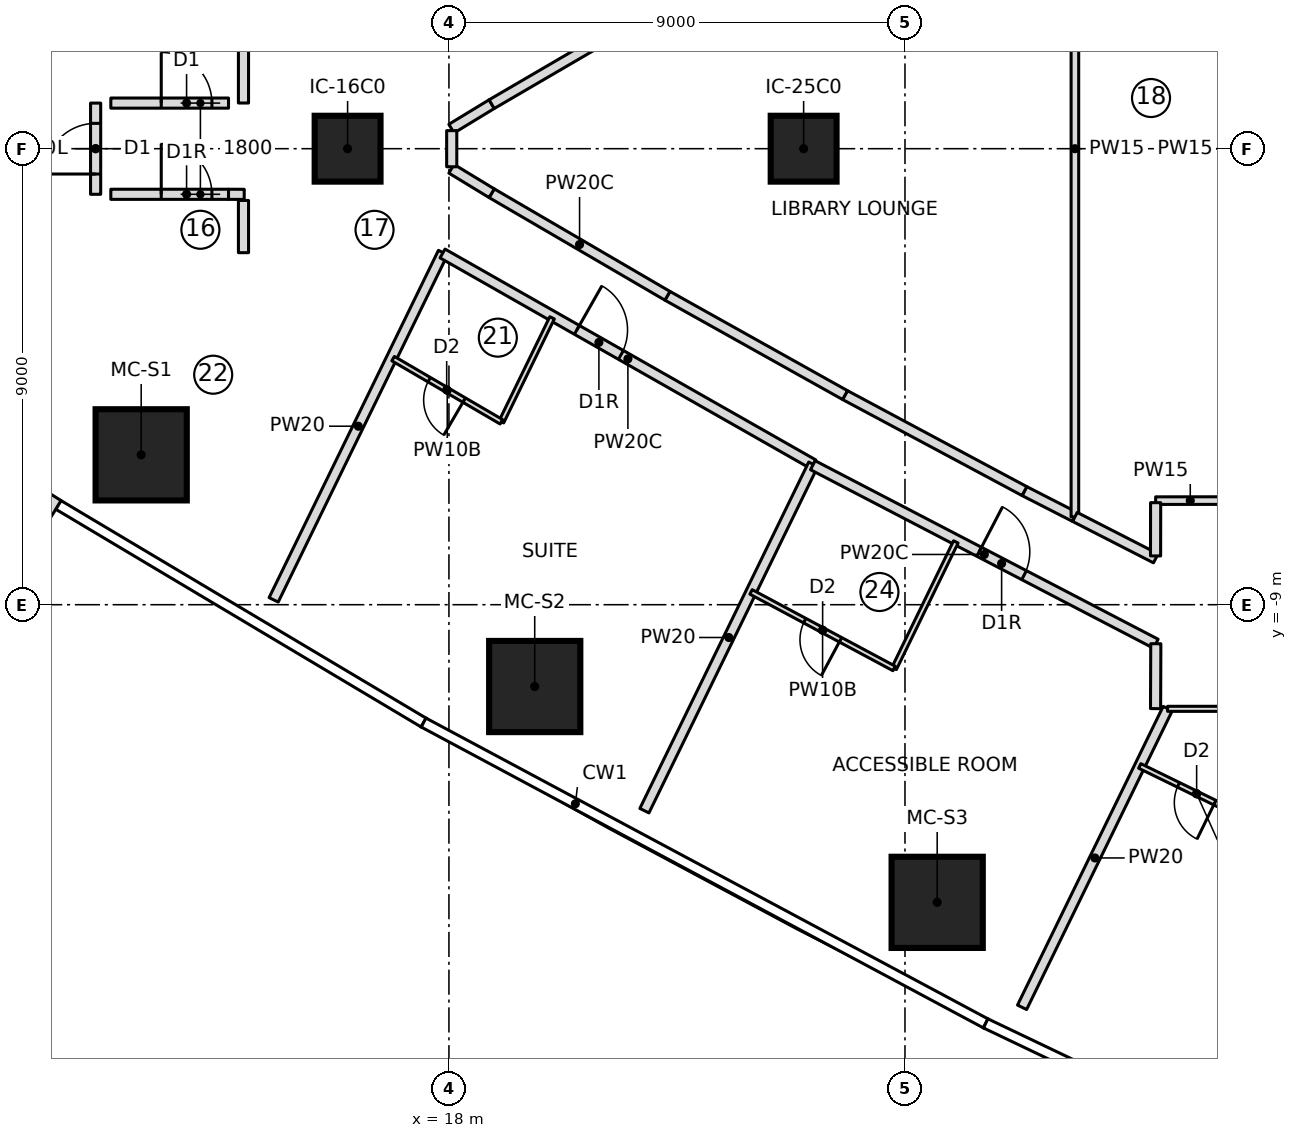
"""IFC4 building model, lengths in metres.
Left out: names, types, materials, properties, quantities, classifications, styles, units other than length and angle.
Written with IfcOpenShell. Run it as: python <this file> out.ifc"""

import sys

from ifc_helpers import new_model, si_unit, direction, frame, frame_2d, origin, origin_2d, place, context, subcontext, project, spatial, polyline, rectangle, outline, extrude, element, fill, save


model = new_model("IFC4")
c1 = context("Model", 3, precision=1e-05, world=origin(), true_north=direction((0.0, 1.0)))
c2 = subcontext(c1, "Body", "Model", "MODEL_VIEW")
j1 = project(units=[si_unit("LENGTHUNIT", "METRE"), si_unit("PLANEANGLEUNIT", "RADIAN")], contexts=[c1])
p1 = place(None, origin())
s1 = spatial("IfcSite", under=j1, at=p1, CompositionType="ELEMENT")
p2 = place(p1, origin())
s2 = spatial("IfcBuilding", under=s1, at=p2, CompositionType="ELEMENT")
p3 = place(p2, frame((0.0, 0.0, 53.8)))
s3 = spatial("IfcBuildingStorey", under=s2, at=p3, CompositionType="ELEMENT", Elevation=53.8)
for number, where, z_axis, x_axis in (
    (1, (11.927, -6.042, 0.0), (0.0, 0.0, 1.0), (1.0, 0.0, 0.0)),
    (2, (19.693, -10.615, 0.0), (0.0, 0.0, 1.0), (1.0, 0.0, 0.0)),
    (3, (27.635, -14.874, 0.0), (0.0, 0.0, 1.0), (1.0, 0.0, 0.0)),
):
    element("IfcColumn", number, at=place(p3, frame(where, z_axis=z_axis, x_axis=x_axis)), inside=s3, PredefinedType="COLUMN", context=c2, shape_type="SweptSolid", body=[
        extrude(rectangle(XDim=1.8, YDim=1.8, at=origin_2d()), origin(), (0.0, 0.0, 1.0), 3.55),
    ])
for number, where, z_axis, x_axis in (
    (4, (16.0, 0.0, 0.0), (0.0, 0.0, 1.0), (1.0, 0.0, 0.0)),
    (5, (25.0, 0.0, 0.0), (0.0, 0.0, 1.0), (1.0, 0.0, 0.0)),
):
    element("IfcColumn", number, at=place(p3, frame(where, z_axis=z_axis, x_axis=x_axis)), inside=s3, PredefinedType="COLUMN", context=c2, shape_type="SweptSolid", body=[
        extrude(rectangle(XDim=1.3, YDim=1.3, at=origin_2d()), origin(), (0.0, 0.0, 1.0), 3.55),
    ])
p4 = place(p3, frame((6.698, -4.87, 0.0), z_axis=(0.0, 0.0, 1.0), x_axis=(0.844551578623, -0.535474211372, 0.0)))
e6 = element("IfcWall", 6, at=p4, inside=s3, PredefinedType="NOTDEFINED", context=c2, shape_type="SweptSolid", body=[
    extrude(outline(polyline([(-0.034, -0.2), (4.196, -0.2), (4.196, 0.2), (0.034, 0.2), (-0.034, -0.2)])), origin(), (0.0, 0.0, 1.0), 3.25),
])
p5 = place(p4, frame((0.998, 0.0, 0.6)))
e7 = element("IfcOpeningElement", 7, at=p5, cuts=e6, PredefinedType="OPENING", context=c2, shape_type="SweptSolid", body=[
    extrude(outline(polyline([(0.0, 1.35), (0.084, 1.771), (0.322, 2.128), (0.679, 2.366), (1.1, 2.45), (1.521, 2.366), (1.878, 2.128), (2.116, 1.771), (2.2, 1.35), (2.2, 1.1), (2.116, 0.679), (1.878, 0.322), (1.521, 0.084), (1.1, 0.0), (0.679, 0.084), (0.322, 0.322), (0.084, 0.679), (0.0, 1.1), (0.0, 1.35)])), frame((0.0, 0.21, 0.0), z_axis=(0.0, -1.0, 0.0), x_axis=(1.0, 0.0, 0.0)), (0.0, 0.0, 1.0), 0.42),
])
p6 = place(p3, frame((11.027, -0.9, 0.0), z_axis=(0.0, 0.0, 1.0), x_axis=(0.0, 1.0, 0.0)))
e8 = element("IfcWall", 8, at=p6, inside=s3, PredefinedType="PARTITIONING", context=c2, shape_type="SweptSolid", body=[
    extrude(rectangle(XDim=1.8, YDim=0.2, at=frame_2d((0.9, 0.0))), origin(), (0.0, 0.0, 1.0), 3.25),
])
p7 = place(p6, frame((0.4, 0.0, 0.0)))
e9 = element("IfcOpeningElement", 9, at=p7, cuts=e8, PredefinedType="OPENING", context=c2, shape_type="SweptSolid", body=[
    extrude(rectangle(XDim=1.0, YDim=2.1, at=frame_2d((0.5, 1.05))), frame((0.0, 0.11, 0.0), z_axis=(0.0, -1.0, 0.0), x_axis=(1.0, 0.0, 0.0)), (0.0, 0.0, 1.0), 0.22),
])
p8 = place(p3, frame((14.541, -8.904, 0.0), z_axis=(0.0, 0.0, 1.0), x_axis=(0.438213564788, 0.898870887078, 0.0)))
e10 = element("IfcWall", 10, at=p8, inside=s3, PredefinedType="PARTITIONING", context=c2, shape_type="SweptSolid", body=[
    extrude(rectangle(XDim=7.625, YDim=0.2, at=frame_2d((3.813, 0.0))), origin(), (0.0, 0.0, 1.0), 3.25),
])
p9 = place(p3, frame((17.874, -2.068, 0.0), z_axis=(0.0, 0.0, 1.0), x_axis=(0.869280098963, -0.494319845391, 0.0)))
e11 = element("IfcWall", 11, at=p9, inside=s3, PredefinedType="PARTITIONING", context=c2, shape_type="SweptSolid", body=[
    extrude(rectangle(XDim=8.417, YDim=0.2, at=frame_2d((4.208, 0.0))), origin(), (0.0, 0.0, 1.0), 3.25),
])
p10 = place(p9, frame((3.05, 0.0, 0.0)))
e12 = element("IfcOpeningElement", 12, at=p10, cuts=e11, PredefinedType="OPENING", context=c2, shape_type="SweptSolid", body=[
    extrude(rectangle(XDim=1.0, YDim=2.1, at=frame_2d((0.5, 1.05))), frame((0.0, 0.11, 0.0), z_axis=(0.0, -1.0, 0.0), x_axis=(1.0, 0.0, 0.0)), (0.0, 0.0, 1.0), 0.22),
])
p11 = place(p3, frame((20.035, -3.338, 0.0), z_axis=(0.0, 0.0, 1.0), x_axis=(-0.438122322582, -0.898915363344, 0.0)))
e13 = element("IfcWall", 13, at=p11, inside=s3, PredefinedType="PARTITIONING", context=c2, shape_type="SweptSolid", body=[
    extrude(rectangle(XDim=2.283, YDim=0.1, at=frame_2d((1.142, 0.0))), origin(), (0.0, 0.0, 1.0), 3.25),
])
p12 = place(p3, frame((19.035, -5.39, 0.0), z_axis=(0.0, 0.0, 1.0), x_axis=(-0.863707305865, 0.503993739837, 0.0)))
e14 = element("IfcWall", 14, at=p12, inside=s3, PredefinedType="PARTITIONING", context=c2, shape_type="SweptSolid", body=[
    extrude(rectangle(XDim=2.474, YDim=0.1, at=frame_2d((1.237, 0.0))), origin(), (0.0, 0.0, 1.0), 3.25),
])
p13 = place(p12, frame((0.85, 0.0, 0.0)))
e15 = element("IfcOpeningElement", 15, at=p13, cuts=e14, PredefinedType="OPENING", context=c2, shape_type="SweptSolid", body=[
    extrude(rectangle(XDim=0.8, YDim=2.1, at=frame_2d((0.4, 1.05))), frame((0.0, 0.06, 0.0), z_axis=(0.0, -1.0, 0.0), x_axis=(1.0, 0.0, 0.0)), (0.0, 0.0, 1.0), 0.12),
])
p14 = place(p3, frame((21.857, -13.065, 0.0), z_axis=(0.0, 0.0, 1.0), x_axis=(0.438202895602, 0.898876088394, 0.0)))
e16 = element("IfcWall", 16, at=p14, inside=s3, PredefinedType="PARTITIONING", context=c2, shape_type="SweptSolid", body=[
    extrude(rectangle(XDim=7.605, YDim=0.2, at=frame_2d((3.803, 0.0))), origin(), (0.0, 0.0, 1.0), 3.25),
])
p15 = place(p3, frame((25.181, -6.247, 0.0), z_axis=(0.0, 0.0, 1.0), x_axis=(0.887026569793, -0.461718382221, 0.0)))
e17 = element("IfcWall", 17, at=p15, inside=s3, PredefinedType="PARTITIONING", context=c2, shape_type="SweptSolid", body=[
    extrude(rectangle(XDim=7.631, YDim=0.2, at=frame_2d((3.815, 0.0))), origin(), (0.0, 0.0, 1.0), 3.25),
])
p16 = place(p15, frame((3.7, 0.0, 0.0)))
e18 = element("IfcOpeningElement", 18, at=p16, cuts=e17, PredefinedType="OPENING", context=c2, shape_type="SweptSolid", body=[
    extrude(rectangle(XDim=1.0, YDim=2.1, at=frame_2d((0.5, 1.05))), frame((0.0, 0.11, 0.0), z_axis=(0.0, -1.0, 0.0), x_axis=(1.0, 0.0, 0.0)), (0.0, 0.0, 1.0), 0.22),
])
p17 = place(p3, frame((28.003, -7.761, 0.0), z_axis=(0.0, 0.0, 1.0), x_axis=(-0.43822975423, -0.898862994292, 0.0)))
e19 = element("IfcWall", 19, at=p17, inside=s3, PredefinedType="PARTITIONING", context=c2, shape_type="SweptSolid", body=[
    extrude(rectangle(XDim=2.779, YDim=0.1, at=frame_2d((1.389, 0.0))), origin(), (0.0, 0.0, 1.0), 3.25),
])
p18 = place(p3, frame((26.785, -10.259, 0.0), z_axis=(0.0, 0.0, 1.0), x_axis=(-0.881653338438, 0.471897648672, 0.0)))
e20 = element("IfcWall", 20, at=p18, inside=s3, PredefinedType="PARTITIONING", context=c2, shape_type="SweptSolid", body=[
    extrude(rectangle(XDim=3.202, YDim=0.1, at=frame_2d((1.601, 0.0))), origin(), (0.0, 0.0, 1.0), 3.25),
])
p19 = place(p18, frame((1.2, 0.0, 0.0)))
e21 = element("IfcOpeningElement", 21, at=p19, cuts=e20, PredefinedType="OPENING", context=c2, shape_type="SweptSolid", body=[
    extrude(rectangle(XDim=0.8, YDim=2.1, at=frame_2d((0.4, 1.05))), frame((0.0, 0.06, 0.0), z_axis=(0.0, -1.0, 0.0), x_axis=(1.0, 0.0, 0.0)), (0.0, 0.0, 1.0), 0.12),
])
p20 = place(p3, frame((29.31, -16.946, 0.0), z_axis=(0.0, 0.0, 1.0), x_axis=(0.438228560869, 0.898863576099, 0.0)))
e22 = element("IfcWall", 22, at=p20, inside=s3, PredefinedType="PARTITIONING", context=c2, shape_type="SweptSolid", body=[
    extrude(rectangle(XDim=6.559, YDim=0.2, at=frame_2d((3.28, 0.0))), origin(), (0.0, 0.0, 1.0), 3.25),
])
p21 = place(p3, frame((33.879, -13.28, 0.0), z_axis=(0.0, 0.0, 1.0), x_axis=(-0.89845285455, 0.439070003702, 0.0)))
e23 = element("IfcWall", 23, at=p21, inside=s3, PredefinedType="PARTITIONING", context=c2, shape_type="SweptSolid", body=[
    extrude(rectangle(XDim=2.5, YDim=0.1, at=frame_2d((1.25, 0.0))), origin(), (0.0, 0.0, 1.0), 3.25),
])
p22 = place(p21, frame((0.85, 0.0, 0.0)))
e24 = element("IfcOpeningElement", 24, at=p22, cuts=e23, PredefinedType="OPENING", context=c2, shape_type="SweptSolid", body=[
    extrude(rectangle(XDim=0.8, YDim=2.1, at=frame_2d((0.4, 1.05))), frame((0.0, 0.06, 0.0), z_axis=(0.0, -1.0, 0.0), x_axis=(1.0, 0.0, 0.0)), (0.0, 0.0, 1.0), 0.12),
])
p23 = place(p3, frame((30.353, -7.268, 0.0), z_axis=(0.0, 0.0, 1.0), x_axis=(-0.890241988655, 0.455487872106, 0.0)))
e25 = element("IfcWall", 25, at=p23, inside=s3, PredefinedType="PARTITIONING", context=c2, shape_type="SweptSolid", body=[
    extrude(rectangle(XDim=1.119, YDim=0.2, at=frame_2d((0.559, 0.0))), origin(), (0.0, 0.0, 1.0), 3.25),
])
p24 = place(p3, frame((29.357, -6.758, 0.0), z_axis=(0.0, 0.0, 1.0), x_axis=(-0.881655245922, 0.471894084874, 0.0)))
e26 = element("IfcWall", 26, at=p24, inside=s3, PredefinedType="PARTITIONING", context=c2, shape_type="SweptSolid", body=[
    extrude(rectangle(XDim=4.016, YDim=0.2, at=frame_2d((2.008, 0.0))), origin(), (0.0, 0.0, 1.0), 3.25),
])
p25 = place(p3, frame((25.817, -4.863, 0.0), z_axis=(0.0, 0.0, 1.0), x_axis=(-0.872800289292, 0.488077509225, 0.0)))
e27 = element("IfcWall", 27, at=p25, inside=s3, PredefinedType="PARTITIONING", context=c2, shape_type="SweptSolid", body=[
    extrude(rectangle(XDim=4.016, YDim=0.2, at=frame_2d((2.008, 0.0))), origin(), (0.0, 0.0, 1.0), 3.25),
])
p26 = place(p3, frame((22.312, -2.903, 0.0), z_axis=(0.0, 0.0, 1.0), x_axis=(-0.863710538269, 0.503988200341, 0.0)))
e28 = element("IfcWall", 28, at=p26, inside=s3, PredefinedType="PARTITIONING", context=c2, shape_type="SweptSolid", body=[
    extrude(rectangle(XDim=4.016, YDim=0.2, at=frame_2d((2.008, 0.0))), origin(), (0.0, 0.0, 1.0), 3.25),
])
for number, where, z_axis, x_axis in (
    (29, (18.844, -0.879, 0.0), (0.0, 0.0, 1.0), (-0.854, 0.52, 0.0)),
    (30, (18.05, 0.396, 0.0), (0.0, 0.0, 1.0), (0.854, 0.52, 0.0)),
):
    element("IfcWall", number, at=place(p3, frame(where, z_axis=z_axis, x_axis=x_axis)), inside=s3, PredefinedType="PARTITIONING", context=c2, shape_type="SweptSolid", body=[
        extrude(rectangle(XDim=0.929, YDim=0.2, at=frame_2d((0.464, 0.0))), origin(), (0.0, 0.0, 1.0), 3.25),
    ])
p27 = place(p3, frame((18.844, 0.879, 0.0), z_axis=(0.0, 0.0, 1.0), x_axis=(0.863710538269, 0.503988200341, 0.0)))
e31 = element("IfcWall", 31, at=p27, inside=s3, PredefinedType="PARTITIONING", context=c2, shape_type="SweptSolid", body=[
    extrude(rectangle(XDim=4.016, YDim=0.2, at=frame_2d((2.008, 0.0))), origin(), (0.0, 0.0, 1.0), 3.25),
])
p28 = place(p3, frame((30.353, -7.268, 0.0), z_axis=(0.0, 0.0, 1.0), x_axis=(0.0, 1.0, 0.0)))
e32 = element("IfcWall", 32, at=p28, inside=s3, PredefinedType="PARTITIONING", context=c2, shape_type="SweptSolid", body=[
    extrude(rectangle(XDim=14.535, YDim=0.15, at=frame_2d((7.268, 0.0))), origin(), (0.0, 0.0, 1.0), 3.25),
])
p29 = place(p3, frame((31.95, -8.085, 0.0), z_axis=(0.0, 0.0, 1.0), x_axis=(-0.890195531144, 0.455578660969, 0.0)))
e33 = element("IfcWall", 33, at=p29, inside=s3, PredefinedType="PARTITIONING", context=c2, shape_type="SweptSolid", body=[
    extrude(rectangle(XDim=1.794, YDim=0.2, at=frame_2d((0.897, 0.0))), origin(), (0.0, 0.0, 1.0), 3.25),
])
p30 = place(p3, frame((32.182, -11.055, 0.0), z_axis=(0.0, 0.0, 1.0), x_axis=(1.0, 0.0, 0.0)))
e34 = element("IfcWall", 34, at=p30, inside=s3, PredefinedType="PARTITIONING", context=c2, shape_type="SweptSolid", body=[
    extrude(rectangle(XDim=2.371, YDim=0.1, at=frame_2d((1.186, 0.0))), origin(), (0.0, 0.0, 1.0), 3.25),
])
p31 = place(p3, frame((11.327, 0.9, 0.0), z_axis=(0.0, 0.0, 1.0), x_axis=(1.0, 0.0, 0.0)))
e35 = element("IfcWall", 35, at=p31, inside=s3, PredefinedType="PARTITIONING", context=c2, shape_type="SweptSolid", body=[
    extrude(rectangle(XDim=2.323, YDim=0.2, at=frame_2d((1.161, 0.0))), origin(), (0.0, 0.0, 1.0), 3.25),
])
p32 = place(p31, frame((0.995, 0.0, 0.0)))
e36 = element("IfcOpeningElement", 36, at=p32, cuts=e35, PredefinedType="OPENING", context=c2, shape_type="SweptSolid", body=[
    extrude(rectangle(XDim=1.0, YDim=2.1, at=frame_2d((0.5, 1.05))), frame((0.0, 0.11, 0.0), z_axis=(0.0, -1.0, 0.0), x_axis=(1.0, 0.0, 0.0)), (0.0, 0.0, 1.0), 0.22),
])
p33 = place(p3, frame((11.327, -0.9, 0.0), z_axis=(0.0, 0.0, 1.0), x_axis=(1.0, 0.0, 0.0)))
e37 = element("IfcWall", 37, at=p33, inside=s3, PredefinedType="PARTITIONING", context=c2, shape_type="SweptSolid", body=[
    extrude(rectangle(XDim=2.323, YDim=0.2, at=frame_2d((1.161, 0.0))), origin(), (0.0, 0.0, 1.0), 3.25),
])
p34 = place(p33, frame((0.995, 0.0, 0.0)))
e38 = element("IfcOpeningElement", 38, at=p34, cuts=e37, PredefinedType="OPENING", context=c2, shape_type="SweptSolid", body=[
    extrude(rectangle(XDim=1.0, YDim=2.1, at=frame_2d((0.5, 1.05))), frame((0.0, 0.11, 0.0), z_axis=(0.0, -1.0, 0.0), x_axis=(1.0, 0.0, 0.0)), (0.0, 0.0, 1.0), 0.22),
])
p35 = place(p3, frame((18.055, -0.357, 0.0), z_axis=(0.0, 0.0, 1.0), x_axis=(0.0, 1.0, 0.0)))
e39 = element("IfcWall", 39, at=p35, inside=s3, PredefinedType="PARTITIONING", context=c2, shape_type="SweptSolid", body=[
    extrude(rectangle(XDim=0.713, YDim=0.2, at=frame_2d((0.357, 0.0))), origin(), (0.0, 0.0, 1.0), 3.25),
])
p36 = place(p3, frame((33.313, -6.945, 0.0), z_axis=(0.0, 0.0, 1.0), x_axis=(-0.999999744625, -0.00071466839, 0.0)))
e40 = element("IfcWall", 40, at=p36, inside=s3, PredefinedType="PARTITIONING", context=c2, shape_type="SweptSolid", body=[
    extrude(rectangle(XDim=1.366, YDim=0.15, at=frame_2d((0.683, 0.0))), origin(), (0.0, 0.0, 1.0), 3.25),
])
p37 = place(p3, frame((31.947, -6.986, 0.0), z_axis=(0.0, 0.0, 1.0), x_axis=(-0.001625636496, -0.999998678652, 0.0)))
e41 = element("IfcWall", 41, at=p37, inside=s3, PredefinedType="PARTITIONING", context=c2, shape_type="SweptSolid", body=[
    extrude(rectangle(XDim=1.051, YDim=0.2, at=frame_2d((0.526, 0.0))), origin(), (0.0, 0.0, 1.0), 3.25),
])
p38 = place(p3, frame((13.946, 2.052, 0.0), z_axis=(0.0, 0.0, 1.0), x_axis=(-0.000424178117, -0.999999910036, 0.0)))
e42 = element("IfcWall", 42, at=p38, inside=s3, PredefinedType="PARTITIONING", context=c2, shape_type="SweptSolid", body=[
    extrude(rectangle(XDim=1.151, YDim=0.2, at=frame_2d((0.576, 0.0))), origin(), (0.0, 0.0, 1.0), 3.25),
])
p39 = place(p3, frame((13.65, -0.9, 0.0), z_axis=(0.0, 0.0, 1.0), x_axis=(0.999984810316, -0.005511727301, 0.0)))
e43 = element("IfcWall", 43, at=p39, inside=s3, PredefinedType="PARTITIONING", context=c2, shape_type="SweptSolid", body=[
    extrude(rectangle(XDim=0.31, YDim=0.2, at=frame_2d((0.155, 0.0))), origin(), (0.0, 0.0, 1.0), 3.25),
])
p40 = place(p3, frame((13.945, -1.021, 0.0), z_axis=(0.0, 0.0, 1.0), x_axis=(0.000473596916, -0.999999887853, 0.0)))
e44 = element("IfcWall", 44, at=p40, inside=s3, PredefinedType="PARTITIONING", context=c2, shape_type="SweptSolid", body=[
    extrude(rectangle(XDim=1.031, YDim=0.2, at=frame_2d((0.516, 0.0))), origin(), (0.0, 0.0, 1.0), 3.25),
])
p41 = place(p3, frame((31.95, -9.77, 0.0), z_axis=(0.0, 0.0, 1.0), x_axis=(-0.003811674235, -0.999992735543, 0.0)))
e45 = element("IfcWall", 45, at=p41, inside=s3, PredefinedType="PARTITIONING", context=c2, shape_type="SweptSolid", body=[
    extrude(rectangle(XDim=1.281, YDim=0.2, at=frame_2d((0.641, 0.0))), origin(), (0.0, 0.0, 1.0), 3.25),
])
p42 = place(p32, origin())
e46 = element("IfcDoor", 46, at=p42, inside=s3, OperationType="SINGLE_SWING_LEFT", PredefinedType="DOOR", context=c2, shape_type="SweptSolid", body=[
    extrude(rectangle(XDim=1.0, YDim=2.1, at=frame_2d((0.5, 1.05))), frame((0.0, 0.025, 0.0), z_axis=(0.0, -1.0, 0.0), x_axis=(1.0, 0.0, 0.0)), (0.0, 0.0, 1.0), 0.05),
])
fill(e36, e46)
p43 = place(p34, origin())
e47 = element("IfcDoor", 47, at=p43, inside=s3, OperationType="SINGLE_SWING_RIGHT", PredefinedType="DOOR", context=c2, shape_type="SweptSolid", body=[
    extrude(rectangle(XDim=1.0, YDim=2.1, at=frame_2d((0.5, 1.05))), frame((0.0, 0.025, 0.0), z_axis=(0.0, -1.0, 0.0), x_axis=(1.0, 0.0, 0.0)), (0.0, 0.0, 1.0), 0.05),
])
fill(e38, e47)
p44 = place(p7, origin())
e48 = element("IfcDoor", 48, at=p44, inside=s3, OperationType="SINGLE_SWING_LEFT", PredefinedType="DOOR", context=c2, shape_type="SweptSolid", body=[
    extrude(rectangle(XDim=1.0, YDim=2.1, at=frame_2d((0.5, 1.05))), frame((0.0, 0.025, 0.0), z_axis=(0.0, -1.0, 0.0), x_axis=(1.0, 0.0, 0.0)), (0.0, 0.0, 1.0), 0.05),
])
fill(e9, e48)
p45 = place(p13, origin())
e49 = element("IfcDoor", 49, at=p45, inside=s3, OperationType="SINGLE_SWING_LEFT", PredefinedType="DOOR", context=c2, shape_type="SweptSolid", body=[
    extrude(rectangle(XDim=0.8, YDim=2.1, at=frame_2d((0.4, 1.05))), frame((0.0, 0.025, 0.0), z_axis=(0.0, -1.0, 0.0), x_axis=(1.0, 0.0, 0.0)), (0.0, 0.0, 1.0), 0.05),
])
fill(e15, e49)
p46 = place(p10, origin())
e50 = element("IfcDoor", 50, at=p46, inside=s3, OperationType="SINGLE_SWING_RIGHT", PredefinedType="DOOR", context=c2, shape_type="SweptSolid", body=[
    extrude(rectangle(XDim=1.0, YDim=2.1, at=frame_2d((0.5, 1.05))), frame((0.0, 0.025, 0.0), z_axis=(0.0, -1.0, 0.0), x_axis=(1.0, 0.0, 0.0)), (0.0, 0.0, 1.0), 0.05),
])
fill(e12, e50)
p47 = place(p19, origin())
e51 = element("IfcDoor", 51, at=p47, inside=s3, OperationType="SINGLE_SWING_LEFT", PredefinedType="DOOR", context=c2, shape_type="SweptSolid", body=[
    extrude(rectangle(XDim=0.8, YDim=2.1, at=frame_2d((0.4, 1.05))), frame((0.0, 0.025, 0.0), z_axis=(0.0, -1.0, 0.0), x_axis=(1.0, 0.0, 0.0)), (0.0, 0.0, 1.0), 0.05),
])
fill(e21, e51)
p48 = place(p16, origin())
e52 = element("IfcDoor", 52, at=p48, inside=s3, OperationType="SINGLE_SWING_RIGHT", PredefinedType="DOOR", context=c2, shape_type="SweptSolid", body=[
    extrude(rectangle(XDim=1.0, YDim=2.1, at=frame_2d((0.5, 1.05))), frame((0.0, 0.025, 0.0), z_axis=(0.0, -1.0, 0.0), x_axis=(1.0, 0.0, 0.0)), (0.0, 0.0, 1.0), 0.05),
])
fill(e18, e52)
p49 = place(p22, origin())
e53 = element("IfcDoor", 53, at=p49, inside=s3, OperationType="SINGLE_SWING_LEFT", PredefinedType="DOOR", context=c2, shape_type="SweptSolid", body=[
    extrude(rectangle(XDim=0.8, YDim=2.1, at=frame_2d((0.4, 1.05))), frame((0.0, 0.025, 0.0), z_axis=(0.0, -1.0, 0.0), x_axis=(1.0, 0.0, 0.0)), (0.0, 0.0, 1.0), 0.05),
])
fill(e24, e53)
save(model, sys.argv[1])
